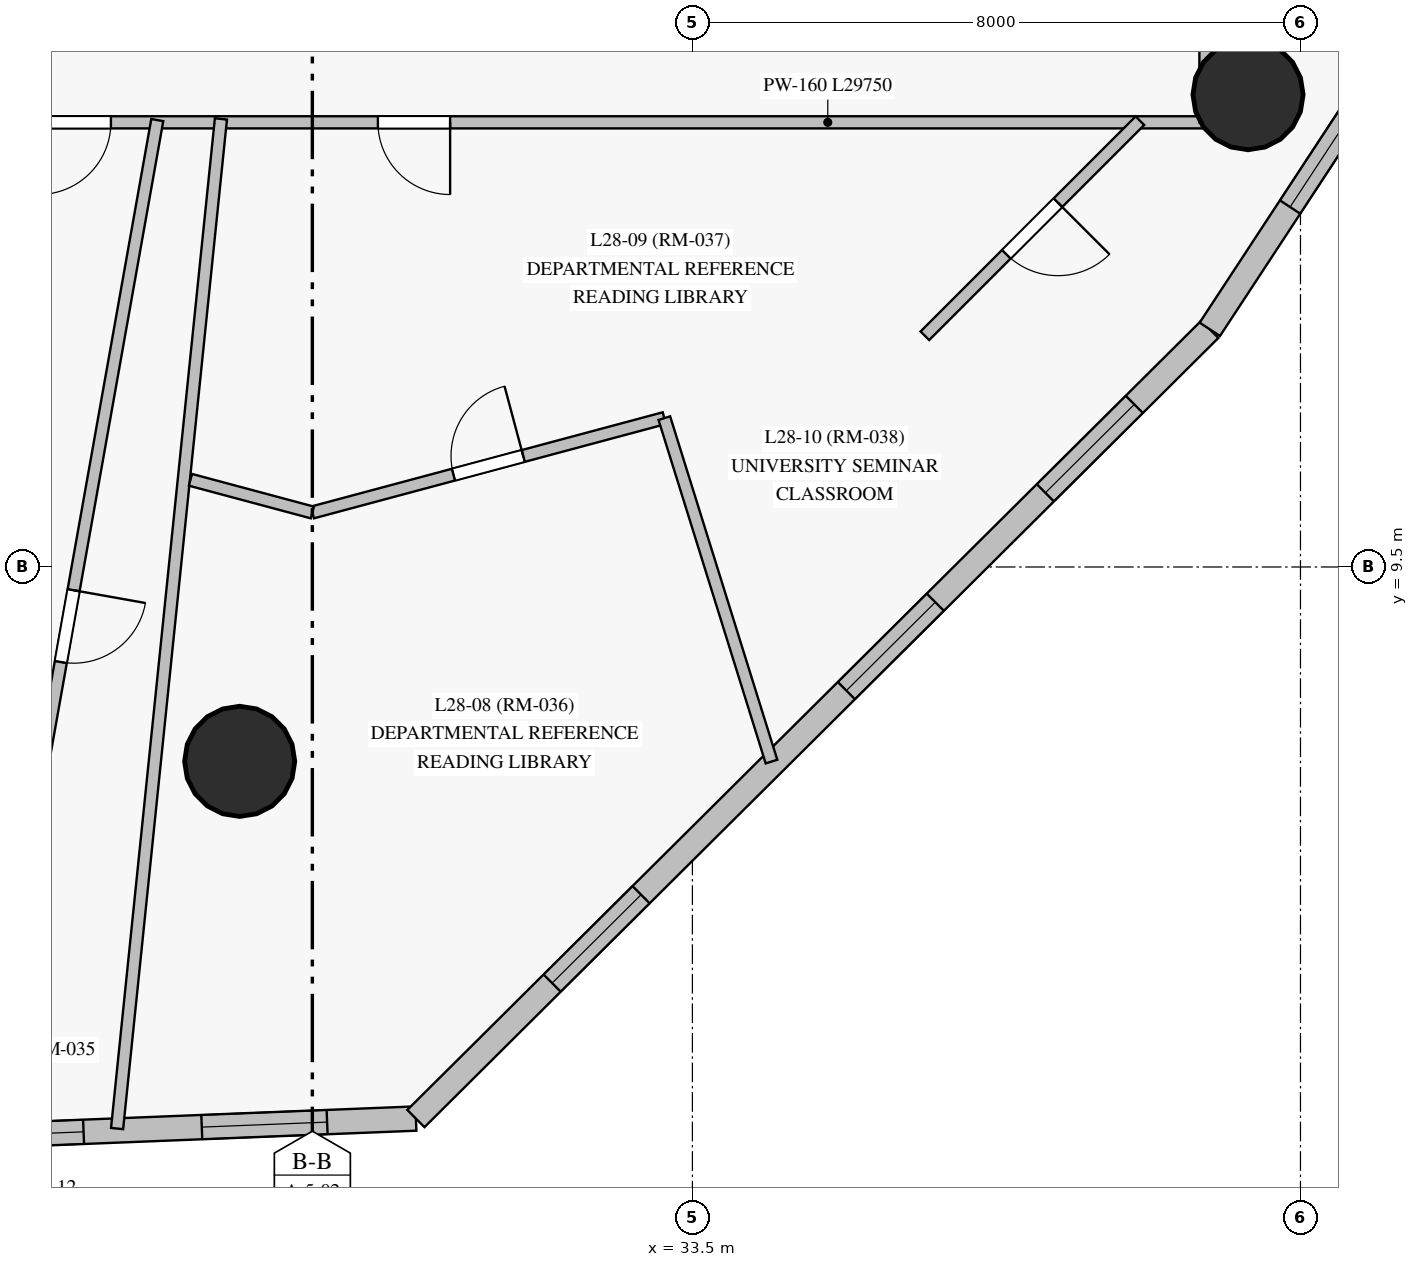
"""IFC4 building model, lengths in metres.
Left out: names, types, materials, properties, quantities, classifications, styles, units other than length and angle.
Written with IfcOpenShell. Run it as: python <this file> out.ifc"""

import sys

from ifc_helpers import new_model, si_unit, direction, frame, frame_2d, origin, origin_with_axes, origin_2d, place, context, subcontext, project, spatial, rectangle, circle, extrude, source, transform, mapped, element, fill, save


model = new_model("IFC4")
c1 = context("Model", 3, precision=1e-05, world=origin(), true_north=direction((0.0, 1.0)))
c2 = subcontext(c1, "Body", "Model", "MODEL_VIEW")
j1 = project(units=[si_unit("LENGTHUNIT", "METRE"), si_unit("PLANEANGLEUNIT", "RADIAN")], contexts=[c1])
p1 = place(None, origin())
s1 = spatial("IfcSite", under=j1, at=p1, CompositionType="ELEMENT")
p2 = place(p1, origin())
s2 = spatial("IfcBuilding", under=s1, at=p2, CompositionType="ELEMENT")
p3 = place(p2, frame((0.0, 0.0, 105.35)))
s3 = spatial("IfcBuildingStorey", under=s2, at=p3, CompositionType="ELEMENT", Elevation=105.35)
m1 = source(origin_with_axes(), c2, "Body", "SweptSolid", [
    extrude(circle(Radius=0.725, at=origin_2d()), origin(), (0.0, 0.0, 1.0), 3.05),
])
for number, where, z_axis, x_axis in (
    (1, (27.544, 6.943, 0.0), (0.0, 0.0, 1.0), (1.0, 0.0, 0.0)),
    (2, (40.81, 15.714, 0.0), (0.0, 0.0, 1.0), (1.0, 0.0, 0.0)),
):
    element("IfcColumn", number, at=place(p3, frame(where, z_axis=z_axis, x_axis=x_axis)), inside=s3, PredefinedType="COLUMN", context=c2, shape_type="MappedRepresentation", body=[
        mapped(m1, transform((0.0, 0.0, 0.0), scale=1.0)),
    ])
p4 = place(p3, frame((20.013, 1.85, 0.0), z_axis=(0.0, 0.0, 1.0), x_axis=(0.999202619629, 0.039926494047, 0.0)))
e3 = element("IfcWall", 3, at=p4, inside=s3, PredefinedType="SOLIDWALL", context=c2, shape_type="SweptSolid", body=[
    extrude(rectangle(XDim=9.857, YDim=0.32, at=frame_2d((4.928, 0.0))), origin(), (0.0, 0.0, 1.0), 2.825),
])
p5 = place(p4, frame((1.247, 0.0, 0.85)))
e4 = element("IfcOpeningElement", 4, at=p5, cuts=e3, PredefinedType="OPENING", context=c2, shape_type="SweptSolid", body=[
    extrude(rectangle(XDim=1.65, YDim=1.65, at=frame_2d((0.825, 0.825))), frame((0.0, 0.17, 0.0), z_axis=(0.0, -1.0, 0.0), x_axis=(1.0, 0.0, 0.0)), (0.0, 0.0, 1.0), 0.34),
])
p6 = place(p4, frame((4.531, 0.0, 0.85)))
e5 = element("IfcOpeningElement", 5, at=p6, cuts=e3, PredefinedType="OPENING", context=c2, shape_type="SweptSolid", body=[
    extrude(rectangle(XDim=0.95, YDim=1.5, at=frame_2d((0.475, 0.75))), frame((0.0, 0.17, 0.0), z_axis=(0.0, -1.0, 0.0), x_axis=(1.0, 0.0, 0.0)), (0.0, 0.0, 1.0), 0.34),
])
p7 = place(p4, frame((7.038, 0.0, 0.85)))
e6 = element("IfcOpeningElement", 6, at=p7, cuts=e3, PredefinedType="OPENING", context=c2, shape_type="SweptSolid", body=[
    extrude(rectangle(XDim=1.65, YDim=1.65, at=frame_2d((0.825, 0.825))), frame((0.0, 0.17, 0.0), z_axis=(0.0, -1.0, 0.0), x_axis=(1.0, 0.0, 0.0)), (0.0, 0.0, 1.0), 0.34),
])
p8 = place(p3, frame((29.862, 2.244, 0.0), z_axis=(0.0, 0.0, 1.0), x_axis=(0.7092089117, 0.704998382668, 0.0)))
e7 = element("IfcWall", 7, at=p8, inside=s3, PredefinedType="SOLIDWALL", context=c2, shape_type="SweptSolid", body=[
    extrude(rectangle(XDim=14.728, YDim=0.32, at=frame_2d((7.364, 0.0))), origin(), (0.0, 0.0, 1.0), 2.825),
])
p9 = place(p8, frame((2.527, 0.0, 0.85)))
e8 = element("IfcOpeningElement", 8, at=p9, cuts=e7, PredefinedType="OPENING", context=c2, shape_type="SweptSolid", body=[
    extrude(rectangle(XDim=1.65, YDim=1.65, at=frame_2d((0.825, 0.825))), frame((0.0, 0.17, 0.0), z_axis=(0.0, -1.0, 0.0), x_axis=(1.0, 0.0, 0.0)), (0.0, 0.0, 1.0), 0.34),
])
p10 = place(p8, frame((7.986, 0.0, 0.85)))
e9 = element("IfcOpeningElement", 9, at=p10, cuts=e7, PredefinedType="OPENING", context=c2, shape_type="SweptSolid", body=[
    extrude(rectangle(XDim=1.65, YDim=1.65, at=frame_2d((0.825, 0.825))), frame((0.0, 0.17, 0.0), z_axis=(0.0, -1.0, 0.0), x_axis=(1.0, 0.0, 0.0)), (0.0, 0.0, 1.0), 0.34),
])
p11 = place(p8, frame((11.677, 0.0, 0.85)))
e10 = element("IfcOpeningElement", 10, at=p11, cuts=e7, PredefinedType="OPENING", context=c2, shape_type="SweptSolid", body=[
    extrude(rectangle(XDim=1.65, YDim=1.65, at=frame_2d((0.825, 0.825))), frame((0.0, 0.17, 0.0), z_axis=(0.0, -1.0, 0.0), x_axis=(1.0, 0.0, 0.0)), (0.0, 0.0, 1.0), 0.34),
])
p12 = place(p3, frame((40.307, 12.627, 0.0), z_axis=(0.0, 0.0, 1.0), x_axis=(0.548726236676, 0.836002103576, 0.0)))
e11 = element("IfcWall", 11, at=p12, inside=s3, PredefinedType="SOLIDWALL", context=c2, shape_type="SweptSolid", body=[
    extrude(rectangle(XDim=10.238, YDim=0.32, at=frame_2d((5.119, 0.0))), origin(), (0.0, 0.0, 1.0), 2.825),
])
p13 = place(p12, frame((1.925, 0.0, 0.85)))
e12 = element("IfcOpeningElement", 12, at=p13, cuts=e11, PredefinedType="OPENING", context=c2, shape_type="SweptSolid", body=[
    extrude(rectangle(XDim=1.65, YDim=1.65, at=frame_2d((0.825, 0.825))), frame((0.0, 0.17, 0.0), z_axis=(0.0, -1.0, 0.0), x_axis=(1.0, 0.0, 0.0)), (0.0, 0.0, 1.0), 0.34),
])
p14 = place(p12, frame((6.664, 0.0, 0.85)))
e13 = element("IfcOpeningElement", 13, at=p14, cuts=e11, PredefinedType="OPENING", context=c2, shape_type="SweptSolid", body=[
    extrude(rectangle(XDim=1.65, YDim=1.65, at=frame_2d((0.825, 0.825))), frame((0.0, 0.17, 0.0), z_axis=(0.0, -1.0, 0.0), x_axis=(1.0, 0.0, 0.0)), (0.0, 0.0, 1.0), 0.34),
])
p15 = place(p3, frame((40.25, 15.35, 0.0), z_axis=(0.0, 0.0, 1.0), x_axis=(-1.0, 0.0, 0.0)))
e14 = element("IfcWall", 14, at=p15, inside=s3, PredefinedType="PARTITIONING", context=c2, shape_type="SweptSolid", body=[
    extrude(rectangle(XDim=29.75, YDim=0.16, at=frame_2d((14.875, 0.0))), origin(), (0.0, 0.0, 1.0), 2.225),
])
p16 = place(p15, frame((21.837, 0.0, 0.0)))
e15 = element("IfcOpeningElement", 15, at=p16, cuts=e14, PredefinedType="OPENING", context=c2, shape_type="SweptSolid", body=[
    extrude(rectangle(XDim=0.95, YDim=2.15, at=frame_2d((0.475, 1.075))), frame((0.0, 0.09, 0.0), z_axis=(0.0, -1.0, 0.0), x_axis=(1.0, 0.0, 0.0)), (0.0, 0.0, 1.0), 0.18),
])
p17 = place(p15, frame((18.722, 0.0, 0.0)))
e16 = element("IfcOpeningElement", 16, at=p17, cuts=e14, PredefinedType="OPENING", context=c2, shape_type="SweptSolid", body=[
    extrude(rectangle(XDim=0.95, YDim=2.15, at=frame_2d((0.475, 1.075))), frame((0.0, 0.09, 0.0), z_axis=(0.0, -1.0, 0.0), x_axis=(1.0, 0.0, 0.0)), (0.0, 0.0, 1.0), 0.18),
])
p18 = place(p15, frame((16.25, 0.0, 0.0)))
e17 = element("IfcOpeningElement", 17, at=p18, cuts=e14, PredefinedType="OPENING", context=c2, shape_type="SweptSolid", body=[
    extrude(rectangle(XDim=0.95, YDim=2.15, at=frame_2d((0.475, 1.075))), frame((0.0, 0.09, 0.0), z_axis=(0.0, -1.0, 0.0), x_axis=(1.0, 0.0, 0.0)), (0.0, 0.0, 1.0), 0.18),
])
p19 = place(p15, frame((14.4, 0.0, 0.0)))
e18 = element("IfcOpeningElement", 18, at=p19, cuts=e14, PredefinedType="OPENING", context=c2, shape_type="SweptSolid", body=[
    extrude(rectangle(XDim=0.95, YDim=2.15, at=frame_2d((0.475, 1.075))), frame((0.0, 0.09, 0.0), z_axis=(0.0, -1.0, 0.0), x_axis=(1.0, 0.0, 0.0)), (0.0, 0.0, 1.0), 0.18),
])
p20 = place(p15, frame((9.938, 0.0, 0.0)))
e19 = element("IfcOpeningElement", 19, at=p20, cuts=e14, PredefinedType="OPENING", context=c2, shape_type="SweptSolid", body=[
    extrude(rectangle(XDim=0.95, YDim=2.15, at=frame_2d((0.475, 1.075))), frame((0.0, 0.09, 0.0), z_axis=(0.0, -1.0, 0.0), x_axis=(1.0, 0.0, 0.0)), (0.0, 0.0, 1.0), 0.18),
])
p21 = place(p3, frame((40.25, 37.65, 0.0), z_axis=(0.0, 0.0, 1.0), x_axis=(0.0, -1.0, 0.0)))
e20 = element("IfcWall", 20, at=p21, inside=s3, PredefinedType="PARTITIONING", context=c2, shape_type="SweptSolid", body=[
    extrude(rectangle(XDim=22.3, YDim=0.16, at=frame_2d((11.15, 0.0))), origin(), (0.0, 0.0, 1.0), 2.225),
])
p22 = place(p21, frame((14.02, 0.0, 0.0)))
e21 = element("IfcOpeningElement", 21, at=p22, cuts=e20, PredefinedType="OPENING", context=c2, shape_type="SweptSolid", body=[
    extrude(rectangle(XDim=0.95, YDim=2.15, at=frame_2d((0.475, 1.075))), frame((0.0, 0.09, 0.0), z_axis=(0.0, -1.0, 0.0), x_axis=(1.0, 0.0, 0.0)), (0.0, 0.0, 1.0), 0.18),
])
p23 = place(p21, frame((10.675, 0.0, 0.0)))
e22 = element("IfcOpeningElement", 22, at=p23, cuts=e20, PredefinedType="OPENING", context=c2, shape_type="SweptSolid", body=[
    extrude(rectangle(XDim=0.95, YDim=2.15, at=frame_2d((0.475, 1.075))), frame((0.0, 0.09, 0.0), z_axis=(0.0, -1.0, 0.0), x_axis=(1.0, 0.0, 0.0)), (0.0, 0.0, 1.0), 0.18),
])
p24 = place(p21, frame((6.207, 0.0, 0.0)))
e23 = element("IfcOpeningElement", 23, at=p24, cuts=e20, PredefinedType="OPENING", context=c2, shape_type="SweptSolid", body=[
    extrude(rectangle(XDim=0.95, YDim=2.15, at=frame_2d((0.475, 1.075))), frame((0.0, 0.09, 0.0), z_axis=(0.0, -1.0, 0.0), x_axis=(1.0, 0.0, 0.0)), (0.0, 0.0, 1.0), 0.18),
])
p25 = place(p21, frame((4.298, 0.0, 0.0)))
e24 = element("IfcOpeningElement", 24, at=p25, cuts=e20, PredefinedType="OPENING", context=c2, shape_type="SweptSolid", body=[
    extrude(rectangle(XDim=0.95, YDim=2.15, at=frame_2d((0.475, 1.075))), frame((0.0, 0.09, 0.0), z_axis=(0.0, -1.0, 0.0), x_axis=(1.0, 0.0, 0.0)), (0.0, 0.0, 1.0), 0.18),
])
p26 = place(p21, frame((1.923, 0.0, 0.0)))
e25 = element("IfcOpeningElement", 25, at=p26, cuts=e20, PredefinedType="OPENING", context=c2, shape_type="SweptSolid", body=[
    extrude(rectangle(XDim=0.96, YDim=2.15, at=frame_2d((0.48, 1.075))), frame((0.0, 0.09, 0.0), z_axis=(0.0, -1.0, 0.0), x_axis=(1.0, 0.0, 0.0)), (0.0, 0.0, 1.0), 0.18),
])
p27 = place(p3, frame((26.46, 15.379, 0.0), z_axis=(0.0, 0.0, 1.0), x_axis=(-0.175226234802, -0.984528194943, 0.0)))
e26 = element("IfcWall", 26, at=p27, inside=s3, PredefinedType="PARTITIONING", context=c2, shape_type="SweptSolid", body=[
    extrude(rectangle(XDim=13.55, YDim=0.16, at=frame_2d((6.775, 0.0))), origin(), (0.0, 0.0, 1.0), 2.225),
])
p28 = place(p27, frame((6.282, 0.0, 0.0)))
e27 = element("IfcOpeningElement", 27, at=p28, cuts=e26, PredefinedType="OPENING", context=c2, shape_type="SweptSolid", body=[
    extrude(rectangle(XDim=0.96, YDim=2.15, at=frame_2d((0.48, 1.075))), frame((0.0, 0.09, 0.0), z_axis=(0.0, -1.0, 0.0), x_axis=(1.0, 0.0, 0.0)), (0.0, 0.0, 1.0), 0.18),
])
p29 = place(p3, frame((27.297, 15.395, 0.0), z_axis=(0.0, 0.0, 1.0), x_axis=(-0.102334594385, -0.994750034326, 0.0)))
e28 = element("IfcWall", 28, at=p29, inside=s3, PredefinedType="PARTITIONING", context=c2, shape_type="SweptSolid", body=[
    extrude(rectangle(XDim=13.353, YDim=0.16, at=frame_2d((6.676, 0.0))), origin(), (0.0, 0.0, 1.0), 2.225),
])
p30 = place(p3, frame((28.5, 10.217, 0.0), z_axis=(0.0, 0.0, 1.0), x_axis=(0.965931685924, 0.258797175657, 0.0)))
e29 = element("IfcWall", 29, at=p30, inside=s3, PredefinedType="PARTITIONING", context=c2, shape_type="SweptSolid", body=[
    extrude(rectangle(XDim=4.794, YDim=0.16, at=frame_2d((2.397, 0.0))), origin(), (0.0, 0.0, 1.0), 2.325),
])
p31 = place(p30, frame((1.922, 0.0, 0.0)))
e30 = element("IfcOpeningElement", 30, at=p31, cuts=e29, PredefinedType="OPENING", context=c2, shape_type="SweptSolid", body=[
    extrude(rectangle(XDim=0.95, YDim=2.15, at=frame_2d((0.475, 1.075))), frame((0.0, 0.09, 0.0), z_axis=(0.0, -1.0, 0.0), x_axis=(1.0, 0.0, 0.0)), (0.0, 0.0, 1.0), 0.18),
])
p32 = place(p3, frame((33.131, 11.458, 0.0), z_axis=(0.0, 0.0, 1.0), x_axis=(0.297846136439, -0.954613890014, 0.0)))
e31 = element("IfcWall", 31, at=p32, inside=s3, PredefinedType="PARTITIONING", context=c2, shape_type="SweptSolid", body=[
    extrude(rectangle(XDim=4.733, YDim=0.16, at=frame_2d((2.366, 0.0))), origin(), (0.0, 0.0, 1.0), 2.825),
])
p33 = place(p3, frame((39.388, 15.371, 0.0), z_axis=(0.0, 0.0, 1.0), x_axis=(-0.707137292148, -0.707076268909, 0.0)))
e32 = element("IfcWall", 32, at=p33, inside=s3, PredefinedType="PARTITIONING", context=c2, shape_type="SweptSolid", body=[
    extrude(rectangle(XDim=4.001, YDim=0.16, at=frame_2d((2.0, 0.0))), origin(), (0.0, 0.0, 1.0), 2.225),
])
p34 = place(p33, frame((1.525, 0.0, 0.0)))
e33 = element("IfcOpeningElement", 33, at=p34, cuts=e32, PredefinedType="OPENING", context=c2, shape_type="SweptSolid", body=[
    extrude(rectangle(XDim=0.96, YDim=2.15, at=frame_2d((0.48, 1.075))), frame((0.0, 0.09, 0.0), z_axis=(0.0, -1.0, 0.0), x_axis=(1.0, 0.0, 0.0)), (0.0, 0.0, 1.0), 0.18),
])
p35 = place(p3, frame((26.896, 10.647, 0.0), z_axis=(0.0, 0.0, 1.0), x_axis=(0.96593164329, -0.258797334783, 0.0)))
e34 = element("IfcWall", 34, at=p35, inside=s3, PredefinedType="PARTITIONING", context=c2, shape_type="SweptSolid", body=[
    extrude(rectangle(XDim=1.66, YDim=0.16, at=frame_2d((0.83, 0.0))), origin(), (0.0, 0.0, 1.0), 2.325),
])
m2 = source(origin_with_axes(), c2, "Body", "SweptSolid", [
    extrude(rectangle(XDim=0.95, YDim=1.5, at=frame_2d((0.475, 0.75))), frame((0.0, 0.03, 0.0), z_axis=(0.0, -1.0, 0.0), x_axis=(1.0, 0.0, 0.0)), (0.0, 0.0, 1.0), 0.06),
])
p36 = place(p6, origin())
e35 = element("IfcWindow", 35, at=p36, inside=s3, PartitioningType="SINGLE_PANEL", PredefinedType="WINDOW", context=c2, shape_type="MappedRepresentation", body=[
    mapped(m2, transform((0.0, 0.0, 0.0), scale=1.0)),
])
fill(e5, e35)
m3 = source(origin_with_axes(), c2, "Body", "SweptSolid", [
    extrude(rectangle(XDim=1.65, YDim=1.65, at=frame_2d((0.825, 0.825))), frame((0.0, 0.03, 0.0), z_axis=(0.0, -1.0, 0.0), x_axis=(1.0, 0.0, 0.0)), (0.0, 0.0, 1.0), 0.06),
])
p37 = place(p7, origin())
e36 = element("IfcWindow", 36, at=p37, inside=s3, PartitioningType="SINGLE_PANEL", PredefinedType="WINDOW", context=c2, shape_type="MappedRepresentation", body=[
    mapped(m3, transform((0.0, 0.0, 0.0), scale=1.0)),
])
fill(e6, e36)
p38 = place(p9, origin())
e37 = element("IfcWindow", 37, at=p38, inside=s3, PartitioningType="SINGLE_PANEL", PredefinedType="WINDOW", context=c2, shape_type="MappedRepresentation", body=[
    mapped(m3, transform((0.0, 0.0, 0.0), scale=1.0)),
])
fill(e8, e37)
p39 = place(p10, origin())
e38 = element("IfcWindow", 38, at=p39, inside=s3, PartitioningType="SINGLE_PANEL", PredefinedType="WINDOW", context=c2, shape_type="MappedRepresentation", body=[
    mapped(m3, transform((0.0, 0.0, 0.0), scale=1.0)),
])
fill(e9, e38)
p40 = place(p11, origin())
e39 = element("IfcWindow", 39, at=p40, inside=s3, PartitioningType="SINGLE_PANEL", PredefinedType="WINDOW", context=c2, shape_type="MappedRepresentation", body=[
    mapped(m3, transform((0.0, 0.0, 0.0), scale=1.0)),
])
fill(e10, e39)
p41 = place(p13, origin())
e40 = element("IfcWindow", 40, at=p41, inside=s3, PartitioningType="SINGLE_PANEL", PredefinedType="WINDOW", context=c2, shape_type="MappedRepresentation", body=[
    mapped(m3, transform((0.0, 0.0, 0.0), scale=1.0)),
])
fill(e12, e40)
m4 = source(origin_with_axes(), c2, "Body", "SweptSolid", [
    extrude(rectangle(XDim=0.95, YDim=2.15, at=frame_2d((0.475, 1.075))), frame((0.0, 0.025, 0.0), z_axis=(0.0, -1.0, 0.0), x_axis=(1.0, 0.0, 0.0)), (0.0, 0.0, 1.0), 0.05),
])
p42 = place(p19, origin())
e41 = element("IfcDoor", 41, at=p42, inside=s3, OperationType="SINGLE_SWING_RIGHT", PredefinedType="DOOR", context=c2, shape_type="MappedRepresentation", body=[
    mapped(m4, transform((0.0, 0.0, 0.0), scale=1.0)),
])
fill(e18, e41)
p43 = place(p20, origin())
e42 = element("IfcDoor", 42, at=p43, inside=s3, OperationType="SINGLE_SWING_LEFT", PredefinedType="DOOR", context=c2, shape_type="MappedRepresentation", body=[
    mapped(m4, transform((0.0, 0.0, 0.0), scale=1.0)),
])
fill(e19, e42)
m5 = source(origin_with_axes(), c2, "Body", "SweptSolid", [
    extrude(rectangle(XDim=0.96, YDim=2.15, at=frame_2d((0.48, 1.075))), frame((0.0, 0.025, 0.0), z_axis=(0.0, -1.0, 0.0), x_axis=(1.0, 0.0, 0.0)), (0.0, 0.0, 1.0), 0.05),
])
p44 = place(p28, origin())
e43 = element("IfcDoor", 43, at=p44, inside=s3, OperationType="SINGLE_SWING_LEFT", PredefinedType="DOOR", context=c2, shape_type="MappedRepresentation", body=[
    mapped(m5, transform((0.0, 0.0, 0.0), scale=1.0)),
])
fill(e27, e43)
p45 = place(p31, origin())
e44 = element("IfcDoor", 44, at=p45, inside=s3, OperationType="SINGLE_SWING_RIGHT", PredefinedType="DOOR", context=c2, shape_type="MappedRepresentation", body=[
    mapped(m4, transform((0.0, 0.0, 0.0), scale=1.0)),
])
fill(e30, e44)
p46 = place(p34, origin())
e45 = element("IfcDoor", 45, at=p46, inside=s3, OperationType="SINGLE_SWING_LEFT", PredefinedType="DOOR", context=c2, shape_type="MappedRepresentation", body=[
    mapped(m5, transform((0.0, 0.0, 0.0), scale=1.0)),
])
fill(e33, e45)
save(model, sys.argv[1])
